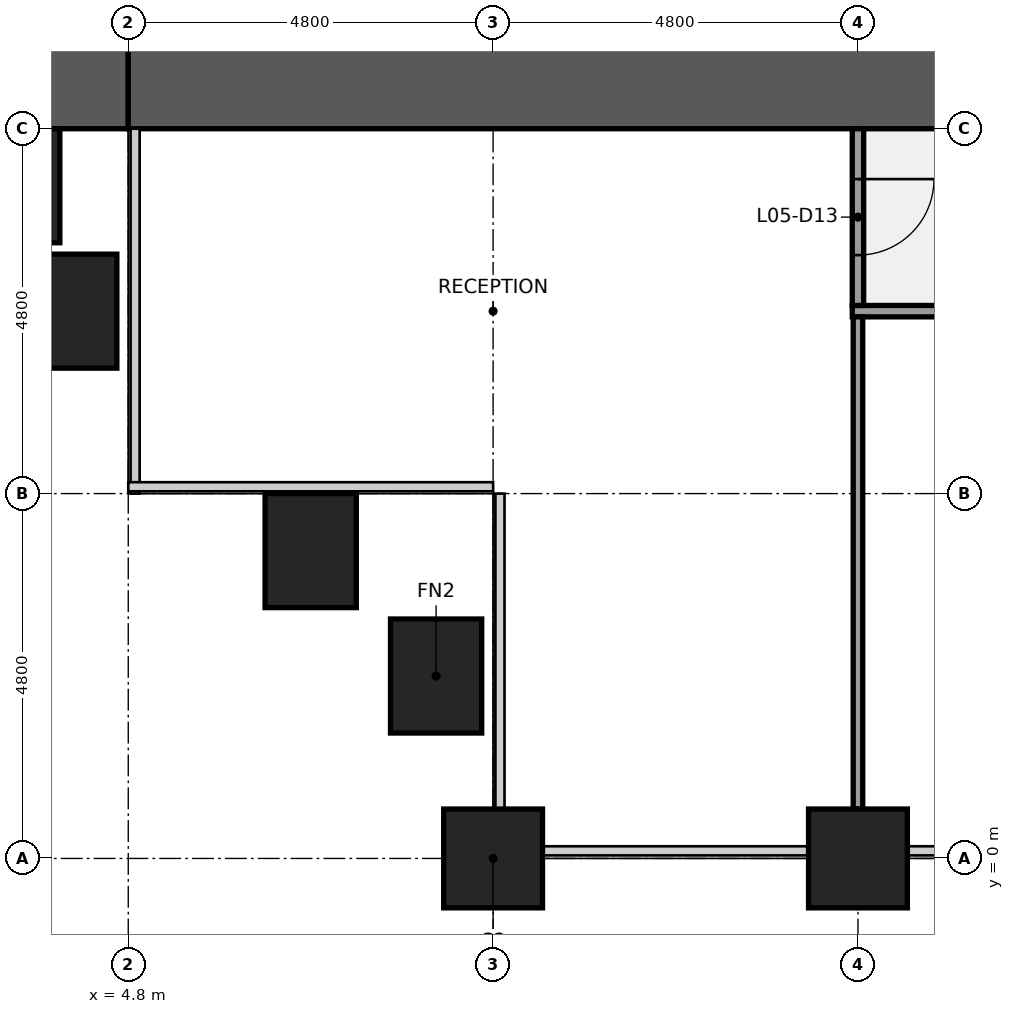
"""IFC4 building model, lengths in metres.
Left out: names, types, materials, properties, quantities, classifications, styles, units other than length and angle.
Written with IfcOpenShell. Run it as: python <this file> out.ifc"""

import sys

from ifc_helpers import new_model, si_unit, direction, frame, frame_2d, origin, origin_2d, place, context, subcontext, project, spatial, rectangle, extrude, element, fill, save


model = new_model("IFC4")
c1 = context("Model", 3, precision=1e-05, world=origin(), true_north=direction((0.0, 1.0)))
c2 = subcontext(c1, "Body", "Model", "MODEL_VIEW")
j1 = project(units=[si_unit("LENGTHUNIT", "METRE"), si_unit("PLANEANGLEUNIT", "RADIAN")], contexts=[c1])
p1 = place(None, origin())
s1 = spatial("IfcSite", under=j1, at=p1, CompositionType="ELEMENT")
p2 = place(p1, origin())
s2 = spatial("IfcBuilding", under=s1, at=p2, CompositionType="ELEMENT")
p3 = place(p2, frame((0.0, 0.0, 30.2)))
s3 = spatial("IfcBuildingStorey", under=s2, at=p3, CompositionType="ELEMENT", Elevation=30.2)
for number, where, z_axis, x_axis in (
    (1, (9.6, 0.0, 0.0), (0.0, 0.0, 1.0), (1.0, 0.0, 0.0)),
    (2, (14.4, 0.0, 0.0), (0.0, 0.0, 1.0), (1.0, 0.0, 0.0)),
):
    element("IfcColumn", number, at=place(p3, frame(where, z_axis=z_axis, x_axis=x_axis)), inside=s3, PredefinedType="COLUMN", context=c2, shape_type="SweptSolid", body=[
        extrude(rectangle(XDim=1.3, YDim=1.3, at=origin_2d()), origin(), (0.0, 0.0, 1.0), 4.4),
    ])
p4 = place(p3, frame((4.8, 10.2, 0.0), z_axis=(0.0, 0.0, 1.0), x_axis=(-1.0, 0.0, 0.0)))
e3 = element("IfcWall", 3, at=p4, inside=s3, PredefinedType="SHEAR", context=c2, shape_type="SweptSolid", body=[
    extrude(rectangle(XDim=3.6, YDim=1.2, at=frame_2d((1.8, 0.0))), origin(), (0.0, 0.0, 1.0), 4.24),
])
p5 = place(p3, frame((18.0, 10.2, 0.0), z_axis=(0.0, 0.0, 1.0), x_axis=(-1.0, 0.0, 0.0)))
e4 = element("IfcWall", 4, at=p5, inside=s3, PredefinedType="SHEAR", context=c2, shape_type="SweptSolid", body=[
    extrude(rectangle(XDim=13.2, YDim=1.2, at=frame_2d((6.6, 0.0))), origin(), (0.0, 0.0, 1.0), 4.24),
])
p6 = place(p5, frame((0.65, 0.0, 0.0)))
e5 = element("IfcOpeningElement", 5, at=p6, cuts=e4, PredefinedType="OPENING", context=c2, shape_type="SweptSolid", body=[
    extrude(rectangle(XDim=1.1, YDim=2.1, at=frame_2d((0.55, 1.05))), frame((0.0, 0.61, 0.0), z_axis=(0.0, -1.0, 0.0), x_axis=(1.0, 0.0, 0.0)), (0.0, 0.0, 1.0), 1.22),
])
p7 = place(p3, frame((14.325, 7.2, 0.0), z_axis=(0.0, 0.0, 1.0), x_axis=(1.0, 0.0, 0.0)))
e6 = element("IfcWall", 6, at=p7, inside=s3, PredefinedType="PARTITIONING", context=c2, shape_type="SweptSolid", body=[
    extrude(rectangle(XDim=4.95, YDim=0.15, at=frame_2d((2.475, 0.0))), origin(), (0.0, 0.0, 1.0), 3.25),
])
p8 = place(p7, frame((1.975, 0.0, 0.0)))
e7 = element("IfcOpeningElement", 7, at=p8, cuts=e6, PredefinedType="OPENING", context=c2, shape_type="SweptSolid", body=[
    extrude(rectangle(XDim=1.0, YDim=2.1, at=frame_2d((0.5, 1.05))), frame((0.0, 0.085, 0.0), z_axis=(0.0, -1.0, 0.0), x_axis=(1.0, 0.0, 0.0)), (0.0, 0.0, 1.0), 0.17),
])
p9 = place(p3, frame((14.4, 0.65, 0.0), z_axis=(0.0, 0.0, 1.0), x_axis=(0.0, 1.0, 0.0)))
e8 = element("IfcWall", 8, at=p9, inside=s3, PredefinedType="PARTITIONING", context=c2, shape_type="SweptSolid", body=[
    extrude(rectangle(XDim=6.475, YDim=0.125, at=frame_2d((3.238, 0.0))), origin(), (0.0, 0.0, 1.0), 3.25),
])
p10 = place(p3, frame((14.4, 7.275, 0.0), z_axis=(0.0, 0.0, 1.0), x_axis=(0.0, 1.0, 0.0)))
e9 = element("IfcWall", 9, at=p10, inside=s3, PredefinedType="PARTITIONING", context=c2, shape_type="SweptSolid", body=[
    extrude(rectangle(XDim=2.325, YDim=0.15, at=frame_2d((1.163, 0.0))), origin(), (0.0, 0.0, 1.0), 3.25),
])
p11 = place(p10, frame((0.663, 0.0, 0.0)))
e10 = element("IfcOpeningElement", 10, at=p11, cuts=e9, PredefinedType="OPENING", context=c2, shape_type="SweptSolid", body=[
    extrude(rectangle(XDim=1.0, YDim=2.1, at=frame_2d((0.5, 1.05))), frame((0.0, 0.085, 0.0), z_axis=(0.0, -1.0, 0.0), x_axis=(1.0, 0.0, 0.0)), (0.0, 0.0, 1.0), 0.17),
])
for number, where, z_axis, x_axis in (
    (11, (4.05, 7.2, 0.0), (0.0, 0.0, 1.0), (0.0, 1.0, 0.0)),
    (12, (7.2, 4.05, 0.0), (0.0, 0.0, 1.0), (1.0, 0.0, 0.0)),
    (13, (8.85, 2.4, 0.0), (0.0, 0.0, 1.0), (0.0, 1.0, 0.0)),
):
    element("IfcColumn", number, at=place(p3, frame(where, z_axis=z_axis, x_axis=x_axis)), inside=s3, PredefinedType="PILASTER", context=c2, shape_type="SweptSolid", body=[
        extrude(rectangle(XDim=1.2, YDim=1.5, at=origin_2d()), origin(), (0.0, 0.0, 1.0), 4.1),
    ])
p12 = place(p3, frame((2.4, 8.85, 0.0), z_axis=(0.0, 0.0, 1.0), x_axis=(1.0, 0.0, 0.0)))
e14 = element("IfcColumn", 14, at=p12, inside=s3, PredefinedType="PILASTER", context=c2, shape_type="SweptSolid", body=[
    extrude(rectangle(XDim=3.0, YDim=1.5, at=origin_2d()), origin(), (0.0, 0.0, 1.0), 4.4),
])
for number, where, z_axis, x_axis in (
    (15, (9.6, -1.075, 0.0), (0.0, 0.0, 1.0), (1.0, 0.0, 0.0)),
    (16, (14.4, -1.075, 0.0), (0.0, 0.0, 1.0), (1.0, 0.0, 0.0)),
):
    element("IfcColumn", number, at=place(p3, frame(where, z_axis=z_axis, x_axis=x_axis)), inside=s3, PredefinedType="PILASTER", context=c2, shape_type="SweptSolid", body=[
        extrude(rectangle(XDim=4.2, YDim=0.85, at=origin_2d()), origin(), (0.0, 0.0, 1.0), 4.4),
    ])
p13 = place(p11, origin())
e17 = element("IfcDoor", 17, at=p13, inside=s3, OperationType="SINGLE_SWING_RIGHT", PredefinedType="DOOR", context=c2, shape_type="SweptSolid", body=[
    extrude(rectangle(XDim=1.0, YDim=2.1, at=frame_2d((0.5, 1.05))), frame((0.0, 0.025, 0.0), z_axis=(0.0, -1.0, 0.0), x_axis=(1.0, 0.0, 0.0)), (0.0, 0.0, 1.0), 0.05),
])
fill(e10, e17)
save(model, sys.argv[1])
